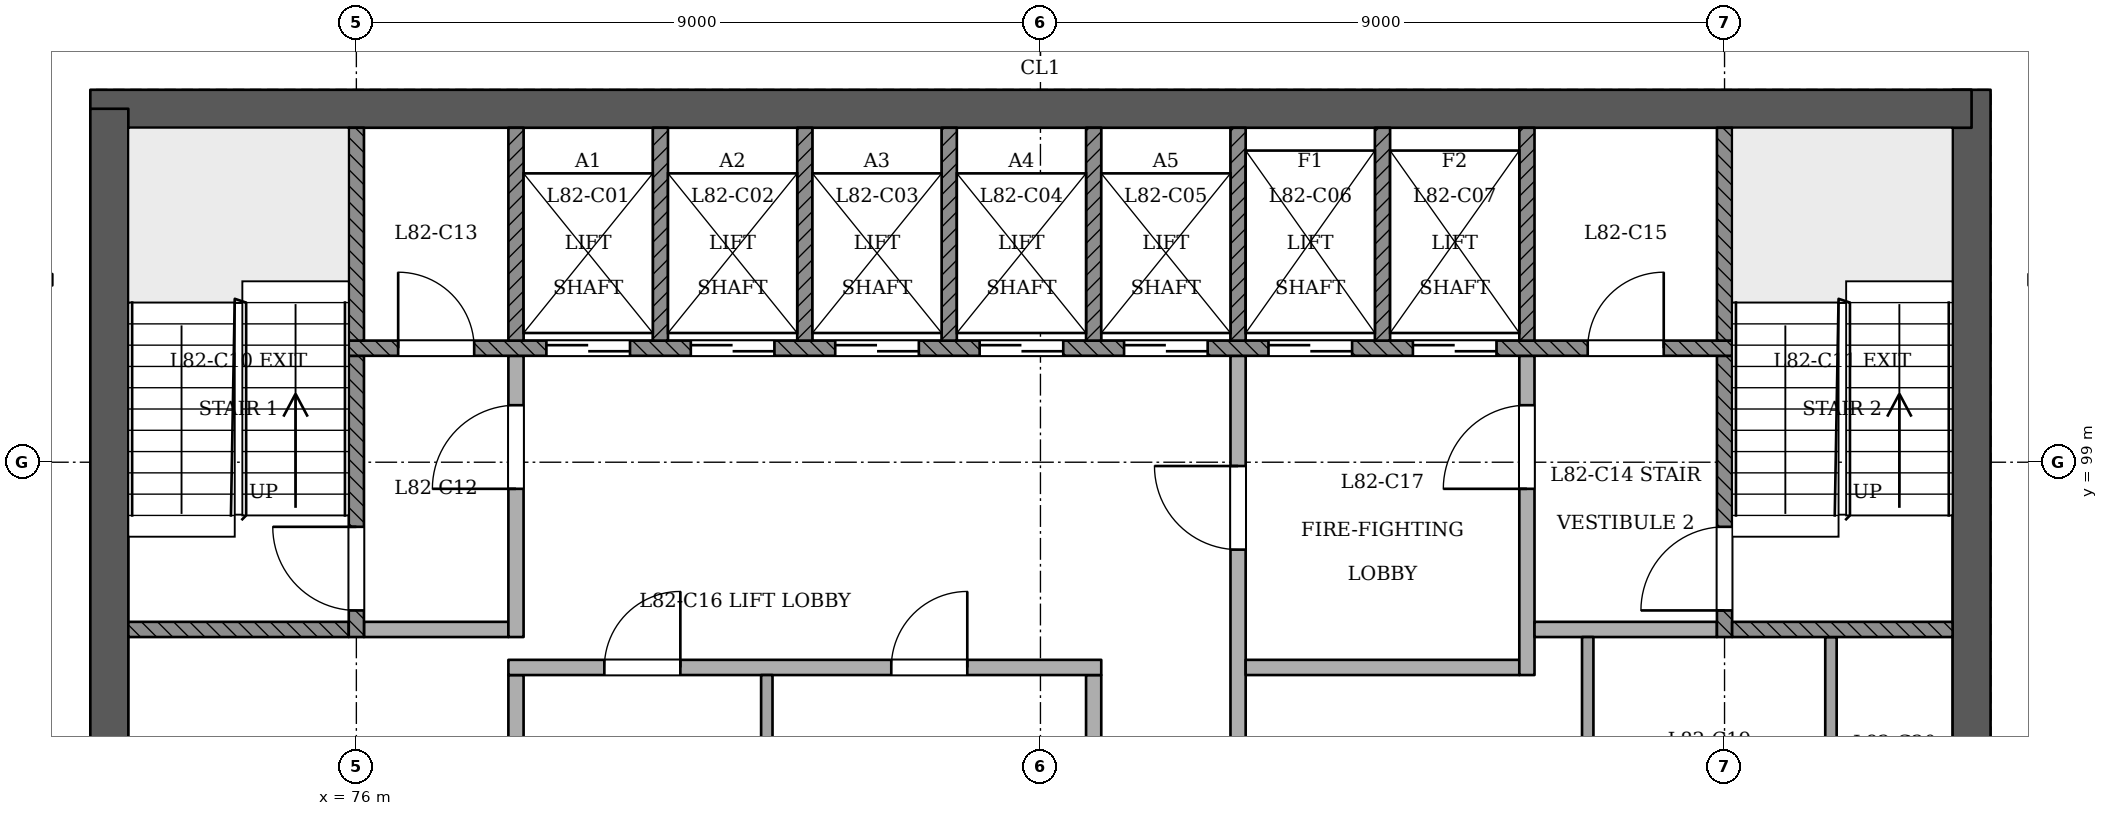
"""IFC4 building model, lengths in metres.
Left out: names, types, materials, properties, quantities, classifications, styles, units other than length and angle.
Written with IfcOpenShell. Run it as: python <this file> out.ifc"""

import sys

from ifc_helpers import new_model, si_unit, direction, frame, frame_2d, origin, place, context, subcontext, project, spatial, rectangle, extrude, element, fill, save


model = new_model("IFC4")
c1 = context("Model", 3, precision=1e-05, world=origin(), true_north=direction((0.0, 1.0)))
c2 = subcontext(c1, "Body", "Model", "MODEL_VIEW")
j1 = project(units=[si_unit("LENGTHUNIT", "METRE"), si_unit("PLANEANGLEUNIT", "RADIAN")], contexts=[c1])
p1 = place(None, origin())
s1 = spatial("IfcSite", under=j1, at=p1, CompositionType="ELEMENT")
p2 = place(p1, origin())
s2 = spatial("IfcBuilding", under=s1, at=p2, CompositionType="ELEMENT")
p3 = place(p2, frame((0.0, 0.0, 316.6)))
s3 = spatial("IfcBuildingStorey", under=s2, at=p3, CompositionType="ELEMENT", Elevation=316.6)
p4 = place(p3, frame((97.25, 93.15, 0.0), z_axis=(0.0, 0.0, 1.0), x_axis=(0.0, 1.0, 0.0)))
e1 = element("IfcWall", 1, at=p4, inside=s3, PredefinedType="SHEAR", context=c2, shape_type="SweptSolid", body=[
    extrude(rectangle(XDim=10.75, YDim=0.5, at=frame_2d((5.375, 0.0))), origin(), (0.0, 0.0, 1.0), 3.6),
])
p5 = place(p3, frame((97.25, 103.65, 0.0), z_axis=(0.0, 0.0, 1.0), x_axis=(-1.0, 0.0, 0.0)))
e2 = element("IfcWall", 2, at=p5, inside=s3, PredefinedType="SHEAR", context=c2, shape_type="SweptSolid", body=[
    extrude(rectangle(XDim=24.75, YDim=0.5, at=frame_2d((12.375, 0.0))), origin(), (0.0, 0.0, 1.0), 3.6),
])
p6 = place(p3, frame((72.75, 103.65, 0.0), z_axis=(0.0, 0.0, 1.0), x_axis=(0.0, -1.0, 0.0)))
e3 = element("IfcWall", 3, at=p6, inside=s3, PredefinedType="SHEAR", context=c2, shape_type="SweptSolid", body=[
    extrude(rectangle(XDim=10.75, YDim=0.5, at=frame_2d((5.375, 0.0))), origin(), (0.0, 0.0, 1.0), 3.6),
])
p7 = place(p3, frame((78.1, 93.4, 0.0), z_axis=(0.0, 0.0, 1.0), x_axis=(0.0, 1.0, 0.0)))
e4 = element("IfcWall", 4, at=p7, inside=s3, PredefinedType="PARTITIONING", context=c2, shape_type="SweptSolid", body=[
    extrude(rectangle(XDim=2.8, YDim=0.2, at=frame_2d((1.4, 0.0))), origin(), (0.0, 0.0, 1.0), 3.2),
])
p8 = place(p3, frame((81.4, 93.4, 0.0), z_axis=(0.0, 0.0, 1.0), x_axis=(0.0, 1.0, 0.0)))
e5 = element("IfcWall", 5, at=p8, inside=s3, PredefinedType="PARTITIONING", context=c2, shape_type="SweptSolid", body=[
    extrude(rectangle(XDim=2.8, YDim=0.15, at=frame_2d((1.4, 0.0))), origin(), (0.0, 0.0, 1.0), 3.2),
])
p9 = place(p3, frame((85.7, 93.4, 0.0), z_axis=(0.0, 0.0, 1.0), x_axis=(0.0, 1.0, 0.0)))
e6 = element("IfcWall", 6, at=p9, inside=s3, PredefinedType="PARTITIONING", context=c2, shape_type="SweptSolid", body=[
    extrude(rectangle(XDim=2.8, YDim=0.2, at=frame_2d((1.4, 0.0))), origin(), (0.0, 0.0, 1.0), 3.2),
])
p10 = place(p3, frame((87.6, 93.4, 0.0), z_axis=(0.0, 0.0, 1.0), x_axis=(0.0, 1.0, 0.0)))
e7 = element("IfcWall", 7, at=p10, inside=s3, PredefinedType="PARTITIONING", context=c2, shape_type="SweptSolid", body=[
    extrude(rectangle(XDim=7.0, YDim=0.2, at=frame_2d((3.5, 0.0))), origin(), (0.0, 0.0, 1.0), 3.2),
])
p11 = place(p10, frame((4.45, 0.0, 0.0)))
e8 = element("IfcOpeningElement", 8, at=p11, cuts=e7, PredefinedType="OPENING", context=c2, shape_type="SweptSolid", body=[
    extrude(rectangle(XDim=1.1, YDim=2.1, at=frame_2d((0.55, 1.05))), frame((0.0, 0.11, 0.0), z_axis=(0.0, -1.0, 0.0), x_axis=(1.0, 0.0, 0.0)), (0.0, 0.0, 1.0), 0.221),
])
for number, where, z_axis, x_axis in (
    (9, (92.2, 93.4, 0.0), (0.0, 0.0, 1.0), (0.0, 1.0, 0.0)),
    (10, (95.4, 93.4, 0.0), (0.0, 0.0, 1.0), (0.0, 1.0, 0.0)),
):
    element("IfcWall", number, at=place(p3, frame(where, z_axis=z_axis, x_axis=x_axis)), inside=s3, PredefinedType="PARTITIONING", context=c2, shape_type="SweptSolid", body=[
        extrude(rectangle(XDim=3.3, YDim=0.15, at=frame_2d((1.65, 0.0))), origin(), (0.0, 0.0, 1.0), 3.2),
    ])
p12 = place(p3, frame((78.0, 96.3, 0.0), z_axis=(0.0, 0.0, 1.0), x_axis=(1.0, 0.0, 0.0)))
e11 = element("IfcWall", 11, at=p12, inside=s3, PredefinedType="PARTITIONING", context=c2, shape_type="SweptSolid", body=[
    extrude(rectangle(XDim=7.8, YDim=0.2, at=frame_2d((3.9, 0.0))), origin(), (0.0, 0.0, 1.0), 3.2),
])
p13 = place(p12, frame((1.262, 0.0, 0.0)))
e12 = element("IfcOpeningElement", 12, at=p13, cuts=e11, PredefinedType="OPENING", context=c2, shape_type="SweptSolid", body=[
    extrude(rectangle(XDim=1.0, YDim=2.1, at=frame_2d((0.5, 1.05))), frame((0.0, 0.11, 0.0), z_axis=(0.0, -1.0, 0.0), x_axis=(1.0, 0.0, 0.0)), (0.0, 0.0, 1.0), 0.221),
])
p14 = place(p12, frame((5.038, 0.0, 0.0)))
e13 = element("IfcOpeningElement", 13, at=p14, cuts=e11, PredefinedType="OPENING", context=c2, shape_type="SweptSolid", body=[
    extrude(rectangle(XDim=1.0, YDim=2.1, at=frame_2d((0.5, 1.05))), frame((0.0, 0.11, 0.0), z_axis=(0.0, -1.0, 0.0), x_axis=(1.0, 0.0, 0.0)), (0.0, 0.0, 1.0), 0.221),
])
p15 = place(p3, frame((87.7, 96.3, 0.0), z_axis=(0.0, 0.0, 1.0), x_axis=(1.0, 0.0, 0.0)))
e14 = element("IfcWall", 14, at=p15, inside=s3, PredefinedType="PARTITIONING", context=c2, shape_type="SweptSolid", body=[
    extrude(rectangle(XDim=3.6, YDim=0.2, at=frame_2d((1.8, 0.0))), origin(), (0.0, 0.0, 1.0), 3.2),
])
p16 = place(p3, frame((91.4, 96.2, 0.0), z_axis=(0.0, 0.0, 1.0), x_axis=(0.0, 1.0, 0.0)))
e15 = element("IfcWall", 15, at=p16, inside=s3, PredefinedType="PARTITIONING", context=c2, shape_type="SweptSolid", body=[
    extrude(rectangle(XDim=4.2, YDim=0.2, at=frame_2d((2.1, 0.0))), origin(), (0.0, 0.0, 1.0), 3.2),
])
p17 = place(p16, frame((2.45, 0.0, 0.0)))
e16 = element("IfcOpeningElement", 16, at=p17, cuts=e15, PredefinedType="OPENING", context=c2, shape_type="SweptSolid", body=[
    extrude(rectangle(XDim=1.1, YDim=2.1, at=frame_2d((0.55, 1.05))), frame((0.0, 0.11, 0.0), z_axis=(0.0, -1.0, 0.0), x_axis=(1.0, 0.0, 0.0)), (0.0, 0.0, 1.0), 0.221),
])
p18 = place(p3, frame((73.0, 96.8, 0.0), z_axis=(0.0, 0.0, 1.0), x_axis=(1.0, 0.0, 0.0)))
e17 = element("IfcWall", 17, at=p18, inside=s3, PredefinedType="SOLIDWALL", context=c2, shape_type="SweptSolid", body=[
    extrude(rectangle(XDim=2.9, YDim=0.2, at=frame_2d((1.45, 0.0))), origin(), (0.0, 0.0, 1.0), 3.2),
])
p19 = place(p3, frame((76.0, 96.7, 0.0), z_axis=(0.0, 0.0, 1.0), x_axis=(0.0, 1.0, 0.0)))
e18 = element("IfcWall", 18, at=p19, inside=s3, PredefinedType="SOLIDWALL", context=c2, shape_type="SweptSolid", body=[
    extrude(rectangle(XDim=3.7, YDim=0.2, at=frame_2d((1.85, 0.0))), origin(), (0.0, 0.0, 1.0), 3.2),
])
p20 = place(p19, frame((0.35, 0.0, 0.0)))
e19 = element("IfcOpeningElement", 19, at=p20, cuts=e18, PredefinedType="OPENING", context=c2, shape_type="SweptSolid", body=[
    extrude(rectangle(XDim=1.1, YDim=2.1, at=frame_2d((0.55, 1.05))), frame((0.0, 0.11, 0.0), z_axis=(0.0, -1.0, 0.0), x_axis=(1.0, 0.0, 0.0)), (0.0, 0.0, 1.0), 0.221),
])
p21 = place(p3, frame((76.1, 96.8, 0.0), z_axis=(0.0, 0.0, 1.0), x_axis=(1.0, 0.0, 0.0)))
e20 = element("IfcWall", 20, at=p21, inside=s3, PredefinedType="PARTITIONING", context=c2, shape_type="SweptSolid", body=[
    extrude(rectangle(XDim=1.9, YDim=0.2, at=frame_2d((0.95, 0.0))), origin(), (0.0, 0.0, 1.0), 3.2),
])
p22 = place(p3, frame((78.1, 96.7, 0.0), z_axis=(0.0, 0.0, 1.0), x_axis=(0.0, 1.0, 0.0)))
e21 = element("IfcWall", 21, at=p22, inside=s3, PredefinedType="PARTITIONING", context=c2, shape_type="SweptSolid", body=[
    extrude(rectangle(XDim=3.7, YDim=0.2, at=frame_2d((1.85, 0.0))), origin(), (0.0, 0.0, 1.0), 3.2),
])
p23 = place(p22, frame((1.95, 0.0, 0.0)))
e22 = element("IfcOpeningElement", 22, at=p23, cuts=e21, PredefinedType="OPENING", context=c2, shape_type="SweptSolid", body=[
    extrude(rectangle(XDim=1.1, YDim=2.1, at=frame_2d((0.55, 1.05))), frame((0.0, 0.11, 0.0), z_axis=(0.0, -1.0, 0.0), x_axis=(1.0, 0.0, 0.0)), (0.0, 0.0, 1.0), 0.221),
])
p24 = place(p3, frame((91.5, 96.8, 0.0), z_axis=(0.0, 0.0, 1.0), x_axis=(1.0, 0.0, 0.0)))
e23 = element("IfcWall", 23, at=p24, inside=s3, PredefinedType="PARTITIONING", context=c2, shape_type="SweptSolid", body=[
    extrude(rectangle(XDim=2.4, YDim=0.2, at=frame_2d((1.2, 0.0))), origin(), (0.0, 0.0, 1.0), 3.2),
])
p25 = place(p3, frame((94.0, 96.7, 0.0), z_axis=(0.0, 0.0, 1.0), x_axis=(0.0, 1.0, 0.0)))
e24 = element("IfcWall", 24, at=p25, inside=s3, PredefinedType="SOLIDWALL", context=c2, shape_type="SweptSolid", body=[
    extrude(rectangle(XDim=3.7, YDim=0.2, at=frame_2d((1.85, 0.0))), origin(), (0.0, 0.0, 1.0), 3.2),
])
p26 = place(p25, frame((0.35, 0.0, 0.0)))
e25 = element("IfcOpeningElement", 25, at=p26, cuts=e24, PredefinedType="OPENING", context=c2, shape_type="SweptSolid", body=[
    extrude(rectangle(XDim=1.1, YDim=2.1, at=frame_2d((0.55, 1.05))), frame((0.0, 0.11, 0.0), z_axis=(0.0, -1.0, 0.0), x_axis=(1.0, 0.0, 0.0)), (0.0, 0.0, 1.0), 0.221),
])
p27 = place(p3, frame((94.1, 96.8, 0.0), z_axis=(0.0, 0.0, 1.0), x_axis=(1.0, 0.0, 0.0)))
e26 = element("IfcWall", 26, at=p27, inside=s3, PredefinedType="SOLIDWALL", context=c2, shape_type="SweptSolid", body=[
    extrude(rectangle(XDim=2.9, YDim=0.2, at=frame_2d((1.45, 0.0))), origin(), (0.0, 0.0, 1.0), 3.2),
])
p28 = place(p3, frame((75.9, 100.5, 0.0), z_axis=(0.0, 0.0, 1.0), x_axis=(1.0, 0.0, 0.0)))
e27 = element("IfcWall", 27, at=p28, inside=s3, PredefinedType="SOLIDWALL", context=c2, shape_type="SweptSolid", body=[
    extrude(rectangle(XDim=18.2, YDim=0.2, at=frame_2d((9.1, 0.0))), origin(), (0.0, 0.0, 1.0), 3.2),
])
p29 = place(p28, frame((2.6, 0.0, 0.0)))
e28 = element("IfcOpeningElement", 28, at=p29, cuts=e27, PredefinedType="OPENING", context=c2, shape_type="SweptSolid", body=[
    extrude(rectangle(XDim=1.1, YDim=2.1, at=frame_2d((0.55, 1.05))), frame((0.0, 0.11, 0.0), z_axis=(0.0, -1.0, 0.0), x_axis=(1.0, 0.0, 0.0)), (0.0, 0.0, 1.0), 0.221),
])
p30 = place(p28, frame((4.5, 0.0, 0.0)))
e29 = element("IfcOpeningElement", 29, at=p30, cuts=e27, PredefinedType="OPENING", context=c2, shape_type="SweptSolid", body=[
    extrude(rectangle(XDim=1.1, YDim=2.1, at=frame_2d((0.55, 1.05))), frame((0.0, 0.11, 0.0), z_axis=(0.0, -1.0, 0.0), x_axis=(1.0, 0.0, 0.0)), (0.0, 0.0, 1.0), 0.221),
])
p31 = place(p28, frame((6.4, 0.0, 0.0)))
e30 = element("IfcOpeningElement", 30, at=p31, cuts=e27, PredefinedType="OPENING", context=c2, shape_type="SweptSolid", body=[
    extrude(rectangle(XDim=1.1, YDim=2.1, at=frame_2d((0.55, 1.05))), frame((0.0, 0.11, 0.0), z_axis=(0.0, -1.0, 0.0), x_axis=(1.0, 0.0, 0.0)), (0.0, 0.0, 1.0), 0.221),
])
p32 = place(p28, frame((8.3, 0.0, 0.0)))
e31 = element("IfcOpeningElement", 31, at=p32, cuts=e27, PredefinedType="OPENING", context=c2, shape_type="SweptSolid", body=[
    extrude(rectangle(XDim=1.1, YDim=2.1, at=frame_2d((0.55, 1.05))), frame((0.0, 0.11, 0.0), z_axis=(0.0, -1.0, 0.0), x_axis=(1.0, 0.0, 0.0)), (0.0, 0.0, 1.0), 0.221),
])
p33 = place(p28, frame((10.2, 0.0, 0.0)))
e32 = element("IfcOpeningElement", 32, at=p33, cuts=e27, PredefinedType="OPENING", context=c2, shape_type="SweptSolid", body=[
    extrude(rectangle(XDim=1.1, YDim=2.1, at=frame_2d((0.55, 1.05))), frame((0.0, 0.11, 0.0), z_axis=(0.0, -1.0, 0.0), x_axis=(1.0, 0.0, 0.0)), (0.0, 0.0, 1.0), 0.221),
])
p34 = place(p28, frame((12.1, 0.0, 0.0)))
e33 = element("IfcOpeningElement", 33, at=p34, cuts=e27, PredefinedType="OPENING", context=c2, shape_type="SweptSolid", body=[
    extrude(rectangle(XDim=1.1, YDim=2.1, at=frame_2d((0.55, 1.05))), frame((0.0, 0.11, 0.0), z_axis=(0.0, -1.0, 0.0), x_axis=(1.0, 0.0, 0.0)), (0.0, 0.0, 1.0), 0.221),
])
p35 = place(p28, frame((14.0, 0.0, 0.0)))
e34 = element("IfcOpeningElement", 34, at=p35, cuts=e27, PredefinedType="OPENING", context=c2, shape_type="SweptSolid", body=[
    extrude(rectangle(XDim=1.1, YDim=2.1, at=frame_2d((0.55, 1.05))), frame((0.0, 0.11, 0.0), z_axis=(0.0, -1.0, 0.0), x_axis=(1.0, 0.0, 0.0)), (0.0, 0.0, 1.0), 0.221),
])
p36 = place(p28, frame((0.65, 0.0, 0.0)))
e35 = element("IfcOpeningElement", 35, at=p36, cuts=e27, PredefinedType="OPENING", context=c2, shape_type="SweptSolid", body=[
    extrude(rectangle(XDim=1.0, YDim=2.1, at=frame_2d((0.5, 1.05))), frame((0.0, 0.11, 0.0), z_axis=(0.0, -1.0, 0.0), x_axis=(1.0, 0.0, 0.0)), (0.0, 0.0, 1.0), 0.221),
])
p37 = place(p28, frame((16.3, 0.0, 0.0)))
e36 = element("IfcOpeningElement", 36, at=p37, cuts=e27, PredefinedType="OPENING", context=c2, shape_type="SweptSolid", body=[
    extrude(rectangle(XDim=1.0, YDim=2.1, at=frame_2d((0.5, 1.05))), frame((0.0, 0.11, 0.0), z_axis=(0.0, -1.0, 0.0), x_axis=(1.0, 0.0, 0.0)), (0.0, 0.0, 1.0), 0.221),
])
for number, where, z_axis, x_axis in (
    (37, (76.0, 100.6, 0.0), (0.0, 0.0, 1.0), (0.0, 1.0, 0.0)),
    (38, (78.1, 100.6, 0.0), (0.0, 0.0, 1.0), (0.0, 1.0, 0.0)),
    (39, (80.0, 100.6, 0.0), (0.0, 0.0, 1.0), (0.0, 1.0, 0.0)),
    (40, (81.9, 100.6, 0.0), (0.0, 0.0, 1.0), (0.0, 1.0, 0.0)),
    (41, (83.8, 100.6, 0.0), (0.0, 0.0, 1.0), (0.0, 1.0, 0.0)),
    (42, (85.7, 100.6, 0.0), (0.0, 0.0, 1.0), (0.0, 1.0, 0.0)),
    (43, (87.6, 100.6, 0.0), (0.0, 0.0, 1.0), (0.0, 1.0, 0.0)),
    (44, (89.5, 100.6, 0.0), (0.0, 0.0, 1.0), (0.0, 1.0, 0.0)),
    (45, (91.4, 100.6, 0.0), (0.0, 0.0, 1.0), (0.0, 1.0, 0.0)),
    (46, (94.0, 100.6, 0.0), (0.0, 0.0, 1.0), (0.0, 1.0, 0.0)),
):
    element("IfcWall", number, at=place(p3, frame(where, z_axis=z_axis, x_axis=x_axis)), inside=s3, PredefinedType="SOLIDWALL", context=c2, shape_type="SweptSolid", body=[
        extrude(rectangle(XDim=2.8, YDim=0.2, at=frame_2d((1.4, 0.0))), origin(), (0.0, 0.0, 1.0), 3.2),
    ])
p38 = place(p29, origin())
e47 = element("IfcDoor", 47, at=p38, inside=s3, OperationType="SLIDING_TO_RIGHT", PredefinedType="NOTDEFINED", context=c2, shape_type="SweptSolid", body=[
    extrude(rectangle(XDim=1.1, YDim=2.1, at=frame_2d((0.55, 1.05))), frame((0.0, 0.025, 0.0), z_axis=(0.0, -1.0, 0.0), x_axis=(1.0, 0.0, 0.0)), (0.0, 0.0, 1.0), 0.05),
])
fill(e28, e47)
p39 = place(p30, origin())
e48 = element("IfcDoor", 48, at=p39, inside=s3, OperationType="SLIDING_TO_LEFT", PredefinedType="NOTDEFINED", context=c2, shape_type="SweptSolid", body=[
    extrude(rectangle(XDim=1.1, YDim=2.1, at=frame_2d((0.55, 1.05))), frame((0.0, 0.025, 0.0), z_axis=(0.0, -1.0, 0.0), x_axis=(1.0, 0.0, 0.0)), (0.0, 0.0, 1.0), 0.05),
])
fill(e29, e48)
p40 = place(p31, origin())
e49 = element("IfcDoor", 49, at=p40, inside=s3, OperationType="SLIDING_TO_RIGHT", PredefinedType="NOTDEFINED", context=c2, shape_type="SweptSolid", body=[
    extrude(rectangle(XDim=1.1, YDim=2.1, at=frame_2d((0.55, 1.05))), frame((0.0, 0.025, 0.0), z_axis=(0.0, -1.0, 0.0), x_axis=(1.0, 0.0, 0.0)), (0.0, 0.0, 1.0), 0.05),
])
fill(e30, e49)
p41 = place(p32, origin())
e50 = element("IfcDoor", 50, at=p41, inside=s3, OperationType="SLIDING_TO_LEFT", PredefinedType="NOTDEFINED", context=c2, shape_type="SweptSolid", body=[
    extrude(rectangle(XDim=1.1, YDim=2.1, at=frame_2d((0.55, 1.05))), frame((0.0, 0.025, 0.0), z_axis=(0.0, -1.0, 0.0), x_axis=(1.0, 0.0, 0.0)), (0.0, 0.0, 1.0), 0.05),
])
fill(e31, e50)
p42 = place(p33, origin())
e51 = element("IfcDoor", 51, at=p42, inside=s3, OperationType="SLIDING_TO_RIGHT", PredefinedType="NOTDEFINED", context=c2, shape_type="SweptSolid", body=[
    extrude(rectangle(XDim=1.1, YDim=2.1, at=frame_2d((0.55, 1.05))), frame((0.0, 0.025, 0.0), z_axis=(0.0, -1.0, 0.0), x_axis=(1.0, 0.0, 0.0)), (0.0, 0.0, 1.0), 0.05),
])
fill(e32, e51)
p43 = place(p34, origin())
e52 = element("IfcDoor", 52, at=p43, inside=s3, OperationType="SLIDING_TO_RIGHT", PredefinedType="NOTDEFINED", context=c2, shape_type="SweptSolid", body=[
    extrude(rectangle(XDim=1.1, YDim=2.1, at=frame_2d((0.55, 1.05))), frame((0.0, 0.025, 0.0), z_axis=(0.0, -1.0, 0.0), x_axis=(1.0, 0.0, 0.0)), (0.0, 0.0, 1.0), 0.05),
])
fill(e33, e52)
p44 = place(p35, origin())
e53 = element("IfcDoor", 53, at=p44, inside=s3, OperationType="SLIDING_TO_LEFT", PredefinedType="NOTDEFINED", context=c2, shape_type="SweptSolid", body=[
    extrude(rectangle(XDim=1.1, YDim=2.1, at=frame_2d((0.55, 1.05))), frame((0.0, 0.025, 0.0), z_axis=(0.0, -1.0, 0.0), x_axis=(1.0, 0.0, 0.0)), (0.0, 0.0, 1.0), 0.05),
])
fill(e34, e53)
p45 = place(p20, origin())
e54 = element("IfcDoor", 54, at=p45, inside=s3, OperationType="SINGLE_SWING_RIGHT", PredefinedType="NOTDEFINED", context=c2, shape_type="SweptSolid", body=[
    extrude(rectangle(XDim=1.1, YDim=2.1, at=frame_2d((0.55, 1.05))), frame((0.0, 0.025, 0.0), z_axis=(0.0, -1.0, 0.0), x_axis=(1.0, 0.0, 0.0)), (0.0, 0.0, 1.0), 0.05),
])
fill(e19, e54)
p46 = place(p26, origin())
e55 = element("IfcDoor", 55, at=p46, inside=s3, OperationType="SINGLE_SWING_LEFT", PredefinedType="NOTDEFINED", context=c2, shape_type="SweptSolid", body=[
    extrude(rectangle(XDim=1.1, YDim=2.1, at=frame_2d((0.55, 1.05))), frame((0.0, 0.025, 0.0), z_axis=(0.0, -1.0, 0.0), x_axis=(1.0, 0.0, 0.0)), (0.0, 0.0, 1.0), 0.05),
])
fill(e25, e55)
p47 = place(p23, origin())
e56 = element("IfcDoor", 56, at=p47, inside=s3, OperationType="SINGLE_SWING_LEFT", PredefinedType="NOTDEFINED", context=c2, shape_type="SweptSolid", body=[
    extrude(rectangle(XDim=1.1, YDim=2.1, at=frame_2d((0.55, 1.05))), frame((0.0, 0.025, 0.0), z_axis=(0.0, -1.0, 0.0), x_axis=(1.0, 0.0, 0.0)), (0.0, 0.0, 1.0), 0.05),
])
fill(e22, e56)
p48 = place(p11, origin())
e57 = element("IfcDoor", 57, at=p48, inside=s3, OperationType="SINGLE_SWING_RIGHT", PredefinedType="NOTDEFINED", context=c2, shape_type="SweptSolid", body=[
    extrude(rectangle(XDim=1.1, YDim=2.1, at=frame_2d((0.55, 1.05))), frame((0.0, 0.025, 0.0), z_axis=(0.0, -1.0, 0.0), x_axis=(1.0, 0.0, 0.0)), (0.0, 0.0, 1.0), 0.05),
])
fill(e8, e57)
p49 = place(p17, origin())
e58 = element("IfcDoor", 58, at=p49, inside=s3, OperationType="SINGLE_SWING_LEFT", PredefinedType="NOTDEFINED", context=c2, shape_type="SweptSolid", body=[
    extrude(rectangle(XDim=1.1, YDim=2.1, at=frame_2d((0.55, 1.05))), frame((0.0, 0.025, 0.0), z_axis=(0.0, -1.0, 0.0), x_axis=(1.0, 0.0, 0.0)), (0.0, 0.0, 1.0), 0.05),
])
fill(e16, e58)
p50 = place(p36, origin())
e59 = element("IfcDoor", 59, at=p50, inside=s3, OperationType="SINGLE_SWING_LEFT", PredefinedType="NOTDEFINED", context=c2, shape_type="SweptSolid", body=[
    extrude(rectangle(XDim=1.0, YDim=2.1, at=frame_2d((0.5, 1.05))), frame((0.0, 0.025, 0.0), z_axis=(0.0, -1.0, 0.0), x_axis=(1.0, 0.0, 0.0)), (0.0, 0.0, 1.0), 0.05),
])
fill(e35, e59)
p51 = place(p37, origin())
e60 = element("IfcDoor", 60, at=p51, inside=s3, OperationType="SINGLE_SWING_RIGHT", PredefinedType="NOTDEFINED", context=c2, shape_type="SweptSolid", body=[
    extrude(rectangle(XDim=1.0, YDim=2.1, at=frame_2d((0.5, 1.05))), frame((0.0, 0.025, 0.0), z_axis=(0.0, -1.0, 0.0), x_axis=(1.0, 0.0, 0.0)), (0.0, 0.0, 1.0), 0.05),
])
fill(e36, e60)
p52 = place(p13, origin())
e61 = element("IfcDoor", 61, at=p52, inside=s3, OperationType="SINGLE_SWING_RIGHT", PredefinedType="NOTDEFINED", context=c2, shape_type="SweptSolid", body=[
    extrude(rectangle(XDim=1.0, YDim=2.1, at=frame_2d((0.5, 1.05))), frame((0.0, 0.025, 0.0), z_axis=(0.0, -1.0, 0.0), x_axis=(1.0, 0.0, 0.0)), (0.0, 0.0, 1.0), 0.05),
])
fill(e12, e61)
p53 = place(p14, origin())
e62 = element("IfcDoor", 62, at=p53, inside=s3, OperationType="SINGLE_SWING_RIGHT", PredefinedType="NOTDEFINED", context=c2, shape_type="SweptSolid", body=[
    extrude(rectangle(XDim=1.0, YDim=2.1, at=frame_2d((0.5, 1.05))), frame((0.0, 0.025, 0.0), z_axis=(0.0, -1.0, 0.0), x_axis=(1.0, 0.0, 0.0)), (0.0, 0.0, 1.0), 0.05),
])
fill(e13, e62)
save(model, sys.argv[1])
